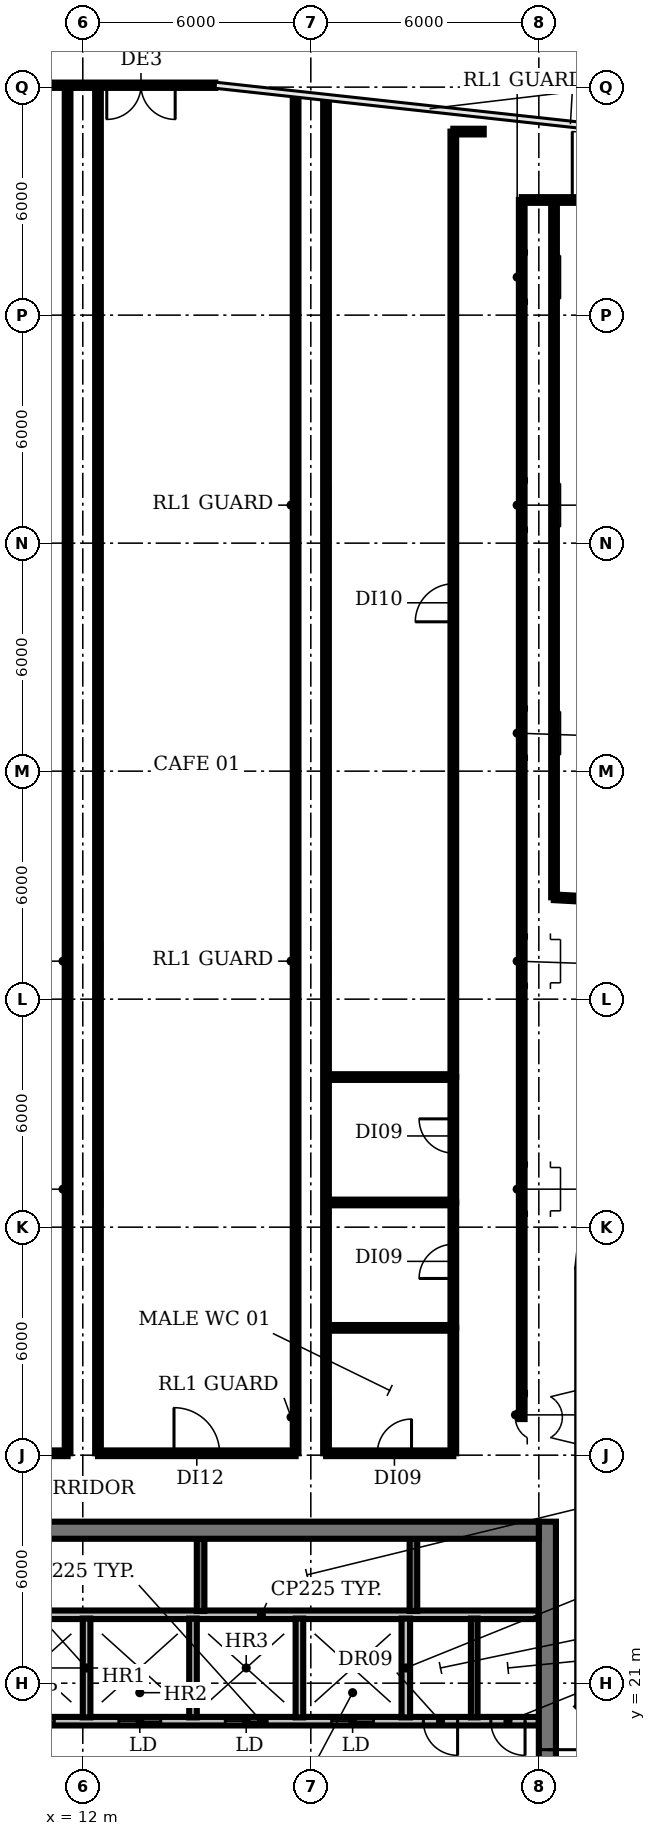
"""IFC4 building model, lengths in metres.
Left out: names, types, materials, properties, quantities, classifications, styles, units other than length and angle.
Written with IfcOpenShell. Run it as: python <this file> out.ifc"""

import sys

from ifc_helpers import new_model, si_unit, direction, frame, frame_2d, origin, place, context, subcontext, project, spatial, rectangle, extrude, element, fill, save


model = new_model("IFC4")
c1 = context("Model", 3, precision=1e-05, world=origin(), true_north=direction((0.0, 1.0)))
c2 = subcontext(c1, "Body", "Model", "MODEL_VIEW")
j1 = project(units=[si_unit("LENGTHUNIT", "METRE"), si_unit("PLANEANGLEUNIT", "RADIAN")], contexts=[c1])
p1 = place(None, origin())
s1 = spatial("IfcSite", under=j1, at=p1, CompositionType="ELEMENT")
p2 = place(p1, origin())
s2 = spatial("IfcBuilding", under=s1, at=p2, CompositionType="ELEMENT")
p3 = place(p2, frame((0.0, 0.0, 255.8)))
s3 = spatial("IfcBuildingStorey", under=s2, at=p3, CompositionType="ELEMENT", Elevation=255.8)
p4 = place(p3, frame((15.487, 63.05, 0.0), z_axis=(0.0, 0.0, 1.0), x_axis=(-1.0, 0.0, 0.0)))
e1 = element("IfcWall", 1, at=p4, inside=s3, PredefinedType="SOLIDWALL", context=c2, shape_type="SweptSolid", body=[
    extrude(rectangle(XDim=5.512, YDim=0.14, at=frame_2d((2.756, 0.0))), origin(), (0.0, 0.0, 1.0), 8.05),
])
p5 = place(p4, frame((1.056, 0.0, 0.0)))
e2 = element("IfcOpeningElement", 2, at=p5, cuts=e1, PredefinedType="OPENING", context=c2, shape_type="SweptSolid", body=[
    extrude(rectangle(XDim=1.8, YDim=2.4, at=frame_2d((0.9, 1.2))), frame((0.0, 0.08, 0.0), z_axis=(0.0, -1.0, 0.0), x_axis=(1.0, 0.0, 0.0)), (0.0, 0.0, 1.0), 0.16),
])
p6 = place(p3, frame((24.0, 20.0, 0.0), z_axis=(0.0, 0.0, 1.0), x_axis=(-1.0, 0.0, 0.0)))
e3 = element("IfcWall", 3, at=p6, inside=s3, PredefinedType="PARTITIONING", context=c2, shape_type="SweptSolid", body=[
    extrude(rectangle(XDim=14.6, YDim=0.225, at=frame_2d((7.3, 0.0))), origin(), (0.0, 0.0, 1.0), 8.05),
])
p7 = place(p6, frame((12.75, 0.0, 0.0)))
e4 = element("IfcOpeningElement", 4, at=p7, cuts=e3, PredefinedType="OPENING", context=c2, shape_type="SweptSolid", body=[
    extrude(rectangle(XDim=1.1, YDim=2.1, at=frame_2d((0.55, 1.05))), frame((0.0, 0.123, 0.0), z_axis=(0.0, -1.0, 0.0), x_axis=(1.0, 0.0, 0.0)), (0.0, 0.0, 1.0), 0.245),
])
p8 = place(p6, frame((9.95, 0.0, 0.0)))
e5 = element("IfcOpeningElement", 5, at=p8, cuts=e3, PredefinedType="OPENING", context=c2, shape_type="SweptSolid", body=[
    extrude(rectangle(XDim=1.1, YDim=2.1, at=frame_2d((0.55, 1.05))), frame((0.0, 0.123, 0.0), z_axis=(0.0, -1.0, 0.0), x_axis=(1.0, 0.0, 0.0)), (0.0, 0.0, 1.0), 0.245),
])
p9 = place(p6, frame((7.15, 0.0, 0.0)))
e6 = element("IfcOpeningElement", 6, at=p9, cuts=e3, PredefinedType="OPENING", context=c2, shape_type="SweptSolid", body=[
    extrude(rectangle(XDim=1.1, YDim=2.1, at=frame_2d((0.55, 1.05))), frame((0.0, 0.123, 0.0), z_axis=(0.0, -1.0, 0.0), x_axis=(1.0, 0.0, 0.0)), (0.0, 0.0, 1.0), 0.245),
])
p10 = place(p6, frame((4.35, 0.0, 0.0)))
e7 = element("IfcOpeningElement", 7, at=p10, cuts=e3, PredefinedType="OPENING", context=c2, shape_type="SweptSolid", body=[
    extrude(rectangle(XDim=1.1, YDim=2.1, at=frame_2d((0.55, 1.05))), frame((0.0, 0.123, 0.0), z_axis=(0.0, -1.0, 0.0), x_axis=(1.0, 0.0, 0.0)), (0.0, 0.0, 1.0), 0.245),
])
p11 = place(p6, frame((2.137, 0.0, 0.0)))
e8 = element("IfcOpeningElement", 8, at=p11, cuts=e3, PredefinedType="OPENING", context=c2, shape_type="SweptSolid", body=[
    extrude(rectangle(XDim=0.9, YDim=2.1, at=frame_2d((0.45, 1.05))), frame((0.0, 0.123, 0.0), z_axis=(0.0, -1.0, 0.0), x_axis=(1.0, 0.0, 0.0)), (0.0, 0.0, 1.0), 0.245),
])
p12 = place(p6, frame((0.363, 0.0, 0.0)))
e9 = element("IfcOpeningElement", 9, at=p12, cuts=e3, PredefinedType="OPENING", context=c2, shape_type="SweptSolid", body=[
    extrude(rectangle(XDim=0.9, YDim=2.1, at=frame_2d((0.45, 1.05))), frame((0.0, 0.123, 0.0), z_axis=(0.0, -1.0, 0.0), x_axis=(1.0, 0.0, 0.0)), (0.0, 0.0, 1.0), 0.245),
])
p13 = place(p3, frame((9.4, 22.8, 0.0), z_axis=(0.0, 0.0, 1.0), x_axis=(1.0, 0.0, 0.0)))
e10 = element("IfcWall", 10, at=p13, inside=s3, PredefinedType="PARTITIONING", context=c2, shape_type="SweptSolid", body=[
    extrude(rectangle(XDim=14.6, YDim=0.225, at=frame_2d((7.3, 0.0))), origin(), (0.0, 0.0, 1.0), 8.05),
])
for number, where, z_axis, x_axis in (
    (11, (12.1, 20.1, 0.0), (0.0, 0.0, 1.0), (0.0, 1.0, 0.0)),
    (12, (14.9, 20.1, 0.0), (0.0, 0.0, 1.0), (0.0, 1.0, 0.0)),
):
    element("IfcWall", number, at=place(p3, frame(where, z_axis=z_axis, x_axis=x_axis)), inside=s3, PredefinedType="SOLIDWALL", context=c2, shape_type="SweptSolid", body=[
        extrude(rectangle(XDim=2.6, YDim=0.2, at=frame_2d((1.3, 0.0))), origin(), (0.0, 0.0, 1.0), 8.05),
    ])
p14 = place(p3, frame((15.1, 22.9, 0.0), z_axis=(0.0, 0.0, 1.0), x_axis=(0.0, 1.0, 0.0)))
e13 = element("IfcWall", 13, at=p14, inside=s3, PredefinedType="SHEAR", context=c2, shape_type="SweptSolid", body=[
    extrude(rectangle(XDim=1.9, YDim=0.2, at=frame_2d((0.95, 0.0))), origin(), (0.0, 0.0, 1.0), 8.05),
])
p15 = place(p3, frame((17.7, 20.1, 0.0), z_axis=(0.0, 0.0, 1.0), x_axis=(0.0, 1.0, 0.0)))
e14 = element("IfcWall", 14, at=p15, inside=s3, PredefinedType="SOLIDWALL", context=c2, shape_type="SweptSolid", body=[
    extrude(rectangle(XDim=2.6, YDim=0.2, at=frame_2d((1.3, 0.0))), origin(), (0.0, 0.0, 1.0), 8.05),
])
p16 = place(p3, frame((20.5, 20.1, 0.0), z_axis=(0.0, 0.0, 1.0), x_axis=(0.0, 1.0, 0.0)))
e15 = element("IfcWall", 15, at=p16, inside=s3, PredefinedType="PARTITIONING", context=c2, shape_type="SweptSolid", body=[
    extrude(rectangle(XDim=2.6, YDim=0.225, at=frame_2d((1.3, 0.0))), origin(), (0.0, 0.0, 1.0), 8.05),
])
p17 = place(p3, frame((20.7, 22.9, 0.0), z_axis=(0.0, 0.0, 1.0), x_axis=(0.0, 1.0, 0.0)))
e16 = element("IfcWall", 16, at=p17, inside=s3, PredefinedType="SHEAR", context=c2, shape_type="SweptSolid", body=[
    extrude(rectangle(XDim=1.9, YDim=0.2, at=frame_2d((0.95, 0.0))), origin(), (0.0, 0.0, 1.0), 8.05),
])
p18 = place(p3, frame((22.3, 20.1, 0.0), z_axis=(0.0, 0.0, 1.0), x_axis=(0.0, 1.0, 0.0)))
e17 = element("IfcWall", 17, at=p18, inside=s3, PredefinedType="PARTITIONING", context=c2, shape_type="SweptSolid", body=[
    extrude(rectangle(XDim=2.6, YDim=0.175, at=frame_2d((1.3, 0.0))), origin(), (0.0, 0.0, 1.0), 8.05),
])
p19 = place(p3, frame((24.225, 25.25, 0.0), z_axis=(0.0, 0.0, 1.0), x_axis=(0.0, -1.0, 0.0)))
e18 = element("IfcWall", 18, at=p19, inside=s3, PredefinedType="SHEAR", context=c2, shape_type="SweptSolid", body=[
    extrude(rectangle(XDim=20.3, YDim=0.45, at=frame_2d((10.15, 0.0))), origin(), (0.0, 0.0, 1.0), 8.05),
])
p20 = place(p19, frame((18.1, 0.0, 0.0)))
e19 = element("IfcOpeningElement", 19, at=p20, cuts=e18, PredefinedType="OPENING", context=c2, shape_type="SweptSolid", body=[
    extrude(rectangle(XDim=1.5, YDim=2.1, at=frame_2d((0.75, 1.05))), frame((0.0, 0.235, 0.0), z_axis=(0.0, -1.0, 0.0), x_axis=(1.0, 0.0, 0.0)), (0.0, 0.0, 1.0), 0.47),
])
p21 = place(p19, frame((12.0, 0.0, 0.0)))
e20 = element("IfcOpeningElement", 20, at=p21, cuts=e18, PredefinedType="OPENING", context=c2, shape_type="SweptSolid", body=[
    extrude(rectangle(XDim=0.9, YDim=2.1, at=frame_2d((0.45, 1.05))), frame((0.0, 0.235, 0.0), z_axis=(0.0, -1.0, 0.0), x_axis=(1.0, 0.0, 0.0)), (0.0, 0.0, 1.0), 0.47),
])
p22 = place(p19, frame((6.0, 0.0, 0.0)))
e21 = element("IfcOpeningElement", 21, at=p22, cuts=e18, PredefinedType="OPENING", context=c2, shape_type="SweptSolid", body=[
    extrude(rectangle(XDim=2.0, YDim=2.1, at=frame_2d((1.0, 1.05))), frame((0.0, 0.235, 0.0), z_axis=(0.0, -1.0, 0.0), x_axis=(1.0, 0.0, 0.0)), (0.0, 0.0, 1.0), 0.47),
])
p23 = place(p3, frame((6.0, 25.025, 0.0), z_axis=(0.0, 0.0, 1.0), x_axis=(1.0, 0.0, 0.0)))
e22 = element("IfcWall", 22, at=p23, inside=s3, PredefinedType="SHEAR", context=c2, shape_type="SweptSolid", body=[
    extrude(rectangle(XDim=18.0, YDim=0.45, at=frame_2d((9.0, 0.0))), origin(), (0.0, 0.0, 1.0), 8.05),
])
p24 = place(p3, frame((6.4, 27.05, 0.0), z_axis=(0.0, 0.0, 1.0), x_axis=(1.0, 0.0, 0.0)))
e23 = element("IfcWall", 23, at=p24, inside=s3, PredefinedType="PARTITIONING", context=c2, shape_type="SweptSolid", body=[
    extrude(rectangle(XDim=5.2, YDim=0.15, at=frame_2d((2.6, 0.0))), origin(), (0.0, 0.0, 1.0), 6.33),
])
p25 = place(p24, frame((2.0, 0.0, 0.0)))
e24 = element("IfcOpeningElement", 24, at=p25, cuts=e23, PredefinedType="OPENING", context=c2, shape_type="SweptSolid", body=[
    extrude(rectangle(XDim=1.2, YDim=2.1, at=frame_2d((0.6, 1.05))), frame((0.0, 0.085, 0.0), z_axis=(0.0, -1.0, 0.0), x_axis=(1.0, 0.0, 0.0)), (0.0, 0.0, 1.0), 0.17),
])
for number, where, z_axis, x_axis in (
    (25, (11.6, 27.05, 0.0), (0.0, 0.0, 1.0), (0.0, 1.0, 0.0)),
    (26, (12.4, 27.05, 0.0), (0.0, 0.0, 1.0), (0.0, 1.0, 0.0)),
):
    element("IfcWall", number, at=place(p3, frame(where, z_axis=z_axis, x_axis=x_axis)), inside=s3, PredefinedType="PARTITIONING", context=c2, shape_type="SweptSolid", body=[
        extrude(rectangle(XDim=35.95, YDim=0.15, at=frame_2d((17.975, 0.0))), origin(), (0.0, 0.0, 1.0), 6.33),
    ])
p26 = place(p3, frame((12.4, 27.05, 0.0), z_axis=(0.0, 0.0, 1.0), x_axis=(1.0, 0.0, 0.0)))
e27 = element("IfcWall", 27, at=p26, inside=s3, PredefinedType="PARTITIONING", context=c2, shape_type="SweptSolid", body=[
    extrude(rectangle(XDim=5.2, YDim=0.15, at=frame_2d((2.6, 0.0))), origin(), (0.0, 0.0, 1.0), 6.33),
])
p27 = place(p26, frame((2.0, 0.0, 0.0)))
e28 = element("IfcOpeningElement", 28, at=p27, cuts=e27, PredefinedType="OPENING", context=c2, shape_type="SweptSolid", body=[
    extrude(rectangle(XDim=1.2, YDim=2.1, at=frame_2d((0.6, 1.05))), frame((0.0, 0.085, 0.0), z_axis=(0.0, -1.0, 0.0), x_axis=(1.0, 0.0, 0.0)), (0.0, 0.0, 1.0), 0.17),
])
p28 = place(p3, frame((17.6, 27.05, 0.0), z_axis=(0.0, 0.0, 1.0), x_axis=(0.0, 1.0, 0.0)))
e29 = element("IfcWall", 29, at=p28, inside=s3, PredefinedType="PARTITIONING", context=c2, shape_type="SweptSolid", body=[
    extrude(rectangle(XDim=35.72, YDim=0.15, at=frame_2d((17.86, 0.0))), origin(), (0.0, 0.0, 1.0), 6.33),
])
p29 = place(p3, frame((18.4, 27.05, 0.0), z_axis=(0.0, 0.0, 1.0), x_axis=(0.0, 1.0, 0.0)))
e30 = element("IfcWall", 30, at=p29, inside=s3, PredefinedType="PARTITIONING", context=c2, shape_type="SweptSolid", body=[
    extrude(rectangle(XDim=35.63, YDim=0.15, at=frame_2d((17.815, 0.0))), origin(), (0.0, 0.0, 1.0), 6.33),
])
p30 = place(p3, frame((18.4, 27.05, 0.0), z_axis=(0.0, 0.0, 1.0), x_axis=(1.0, 0.0, 0.0)))
e31 = element("IfcWall", 31, at=p30, inside=s3, PredefinedType="PARTITIONING", context=c2, shape_type="SweptSolid", body=[
    extrude(rectangle(XDim=3.35, YDim=0.15, at=frame_2d((1.675, 0.0))), origin(), (0.0, 0.0, 1.0), 6.33),
])
p31 = place(p30, frame((1.35, 0.0, 0.0)))
e32 = element("IfcOpeningElement", 32, at=p31, cuts=e31, PredefinedType="OPENING", context=c2, shape_type="SweptSolid", body=[
    extrude(rectangle(XDim=0.9, YDim=2.1, at=frame_2d((0.45, 1.05))), frame((0.0, 0.085, 0.0), z_axis=(0.0, -1.0, 0.0), x_axis=(1.0, 0.0, 0.0)), (0.0, 0.0, 1.0), 0.17),
])
for number, where, z_axis, x_axis in (
    (33, (18.4, 30.35, 0.0), (0.0, 0.0, 1.0), (1.0, 0.0, 0.0)),
    (34, (18.4, 33.65, 0.0), (0.0, 0.0, 1.0), (1.0, 0.0, 0.0)),
    (35, (18.4, 36.95, 0.0), (0.0, 0.0, 1.0), (1.0, 0.0, 0.0)),
):
    element("IfcWall", number, at=place(p3, frame(where, z_axis=z_axis, x_axis=x_axis)), inside=s3, PredefinedType="PARTITIONING", context=c2, shape_type="SweptSolid", body=[
        extrude(rectangle(XDim=3.35, YDim=0.15, at=frame_2d((1.675, 0.0))), origin(), (0.0, 0.0, 1.0), 6.33),
    ])
p32 = place(p3, frame((21.75, 27.05, 0.0), z_axis=(0.0, 0.0, 1.0), x_axis=(0.0, 1.0, 0.0)))
e36 = element("IfcWall", 36, at=p32, inside=s3, PredefinedType="PARTITIONING", context=c2, shape_type="SweptSolid", body=[
    extrude(rectangle(XDim=3.3, YDim=0.15, at=frame_2d((1.65, 0.0))), origin(), (0.0, 0.0, 1.0), 6.33),
])
p33 = place(p3, frame((21.75, 30.35, 0.0), z_axis=(0.0, 0.0, 1.0), x_axis=(0.0, 1.0, 0.0)))
e37 = element("IfcWall", 37, at=p33, inside=s3, PredefinedType="PARTITIONING", context=c2, shape_type="SweptSolid", body=[
    extrude(rectangle(XDim=3.3, YDim=0.15, at=frame_2d((1.65, 0.0))), origin(), (0.0, 0.0, 1.0), 6.33),
])
p34 = place(p33, frame((1.3, 0.0, 0.0)))
e38 = element("IfcOpeningElement", 38, at=p34, cuts=e37, PredefinedType="OPENING", context=c2, shape_type="SweptSolid", body=[
    extrude(rectangle(XDim=0.9, YDim=2.1, at=frame_2d((0.45, 1.05))), frame((0.0, 0.085, 0.0), z_axis=(0.0, -1.0, 0.0), x_axis=(1.0, 0.0, 0.0)), (0.0, 0.0, 1.0), 0.17),
])
p35 = place(p3, frame((21.75, 33.65, 0.0), z_axis=(0.0, 0.0, 1.0), x_axis=(0.0, 1.0, 0.0)))
e39 = element("IfcWall", 39, at=p35, inside=s3, PredefinedType="PARTITIONING", context=c2, shape_type="SweptSolid", body=[
    extrude(rectangle(XDim=3.3, YDim=0.15, at=frame_2d((1.65, 0.0))), origin(), (0.0, 0.0, 1.0), 6.33),
])
p36 = place(p35, frame((1.3, 0.0, 0.0)))
e40 = element("IfcOpeningElement", 40, at=p36, cuts=e39, PredefinedType="OPENING", context=c2, shape_type="SweptSolid", body=[
    extrude(rectangle(XDim=0.9, YDim=2.1, at=frame_2d((0.45, 1.05))), frame((0.0, 0.085, 0.0), z_axis=(0.0, -1.0, 0.0), x_axis=(1.0, 0.0, 0.0)), (0.0, 0.0, 1.0), 0.17),
])
p37 = place(p3, frame((21.75, 36.95, 0.0), z_axis=(0.0, 0.0, 1.0), x_axis=(0.0, 1.0, 0.0)))
e41 = element("IfcWall", 41, at=p37, inside=s3, PredefinedType="PARTITIONING", context=c2, shape_type="SweptSolid", body=[
    extrude(rectangle(XDim=24.88, YDim=0.15, at=frame_2d((12.44, 0.0))), origin(), (0.0, 0.0, 1.0), 6.33),
])
p38 = place(p37, frame((11.98, 0.0, 0.0)))
e42 = element("IfcOpeningElement", 42, at=p38, cuts=e41, PredefinedType="OPENING", context=c2, shape_type="SweptSolid", body=[
    extrude(rectangle(XDim=1.0, YDim=2.1, at=frame_2d((0.5, 1.05))), frame((0.0, 0.085, 0.0), z_axis=(0.0, -1.0, 0.0), x_axis=(1.0, 0.0, 0.0)), (0.0, 0.0, 1.0), 0.17),
])
p39 = place(p3, frame((21.75, 61.83, 0.0), z_axis=(0.0, 0.0, 1.0), x_axis=(1.0, 0.0, 0.0)))
e43 = element("IfcWall", 43, at=p39, inside=s3, PredefinedType="PARTITIONING", context=c2, shape_type="SweptSolid", body=[
    extrude(rectangle(XDim=0.8, YDim=0.15, at=frame_2d((0.4, 0.0))), origin(), (0.0, 0.0, 1.0), 6.33),
])
p40 = place(p3, frame((23.55, 27.95, 0.0), z_axis=(0.0, 0.0, 1.0), x_axis=(0.0, 1.0, 0.0)))
e44 = element("IfcWall", 44, at=p40, inside=s3, PredefinedType="PARTITIONING", context=c2, shape_type="SweptSolid", body=[
    extrude(rectangle(XDim=32.08, YDim=0.15, at=frame_2d((16.04, 0.0))), origin(), (0.0, 0.0, 1.0), 6.33),
])
p41 = place(p3, frame((23.55, 60.03, 0.0), z_axis=(0.0, 0.0, 1.0), x_axis=(1.0, 0.0, 0.0)))
e45 = element("IfcWall", 45, at=p41, inside=s3, PredefinedType="PARTITIONING", context=c2, shape_type="SweptSolid", body=[
    extrude(rectangle(XDim=4.53, YDim=0.15, at=frame_2d((2.265, 0.0))), origin(), (0.0, 0.0, 1.0), 6.33),
])
p42 = place(p41, frame((1.33, 0.0, 0.0)))
e46 = element("IfcOpeningElement", 46, at=p42, cuts=e45, PredefinedType="OPENING", context=c2, shape_type="SweptSolid", body=[
    extrude(rectangle(XDim=1.8, YDim=2.1, at=frame_2d((0.9, 1.05))), frame((0.0, 0.085, 0.0), z_axis=(0.0, -1.0, 0.0), x_axis=(1.0, 0.0, 0.0)), (0.0, 0.0, 1.0), 0.17),
])
p43 = place(p3, frame((24.4, 41.68, 0.0), z_axis=(0.0, 0.0, 1.0), x_axis=(0.0, 1.0, 0.0)))
e47 = element("IfcWall", 47, at=p43, inside=s3, PredefinedType="PARTITIONING", context=c2, shape_type="SweptSolid", body=[
    extrude(rectangle(XDim=18.34, YDim=0.15, at=frame_2d((9.17, 0.0))), origin(), (0.0, 0.0, 1.0), 6.33),
])
p44 = place(p3, frame((24.4, 41.68, 0.0), z_axis=(0.0, 0.0, 1.0), x_axis=(0.998538848833, -0.054038572996, 0.0)))
e48 = element("IfcWall", 48, at=p44, inside=s3, PredefinedType="PARTITIONING", context=c2, shape_type="SweptSolid", body=[
    extrude(rectangle(XDim=1.663, YDim=0.15, at=frame_2d((0.831, 0.0))), origin(), (0.0, 0.0, 1.0), 6.33),
])
p45 = place(p5, origin())
e49 = element("IfcDoor", 49, at=p45, inside=s3, OperationType="DOUBLE_DOOR_DOUBLE_SWING", PredefinedType="DOOR", context=c2, shape_type="SweptSolid", body=[
    extrude(rectangle(XDim=1.8, YDim=2.4, at=frame_2d((0.9, 1.2))), frame((0.0, 0.025, 0.0), z_axis=(0.0, -1.0, 0.0), x_axis=(1.0, 0.0, 0.0)), (0.0, 0.0, 1.0), 0.05),
])
fill(e2, e49)
p46 = place(p7, origin())
e50 = element("IfcDoor", 50, at=p46, inside=s3, OperationType="DOUBLE_DOOR_SLIDING", PredefinedType="DOOR", context=c2, shape_type="SweptSolid", body=[
    extrude(rectangle(XDim=1.1, YDim=2.1, at=frame_2d((0.55, 1.05))), frame((0.0, 0.025, 0.0), z_axis=(0.0, -1.0, 0.0), x_axis=(1.0, 0.0, 0.0)), (0.0, 0.0, 1.0), 0.05),
])
fill(e4, e50)
p47 = place(p8, origin())
e51 = element("IfcDoor", 51, at=p47, inside=s3, OperationType="DOUBLE_DOOR_SLIDING", PredefinedType="DOOR", context=c2, shape_type="SweptSolid", body=[
    extrude(rectangle(XDim=1.1, YDim=2.1, at=frame_2d((0.55, 1.05))), frame((0.0, 0.025, 0.0), z_axis=(0.0, -1.0, 0.0), x_axis=(1.0, 0.0, 0.0)), (0.0, 0.0, 1.0), 0.05),
])
fill(e5, e51)
p48 = place(p9, origin())
e52 = element("IfcDoor", 52, at=p48, inside=s3, OperationType="DOUBLE_DOOR_SLIDING", PredefinedType="DOOR", context=c2, shape_type="SweptSolid", body=[
    extrude(rectangle(XDim=1.1, YDim=2.1, at=frame_2d((0.55, 1.05))), frame((0.0, 0.025, 0.0), z_axis=(0.0, -1.0, 0.0), x_axis=(1.0, 0.0, 0.0)), (0.0, 0.0, 1.0), 0.05),
])
fill(e6, e52)
p49 = place(p10, origin())
e53 = element("IfcDoor", 53, at=p49, inside=s3, OperationType="DOUBLE_DOOR_SLIDING", PredefinedType="DOOR", context=c2, shape_type="SweptSolid", body=[
    extrude(rectangle(XDim=1.1, YDim=2.1, at=frame_2d((0.55, 1.05))), frame((0.0, 0.025, 0.0), z_axis=(0.0, -1.0, 0.0), x_axis=(1.0, 0.0, 0.0)), (0.0, 0.0, 1.0), 0.05),
])
fill(e7, e53)
p50 = place(p11, origin())
e54 = element("IfcDoor", 54, at=p50, inside=s3, OperationType="SINGLE_SWING_LEFT", PredefinedType="DOOR", context=c2, shape_type="SweptSolid", body=[
    extrude(rectangle(XDim=0.9, YDim=2.1, at=frame_2d((0.45, 1.05))), frame((0.0, 0.025, 0.0), z_axis=(0.0, -1.0, 0.0), x_axis=(1.0, 0.0, 0.0)), (0.0, 0.0, 1.0), 0.05),
])
fill(e8, e54)
p51 = place(p12, origin())
e55 = element("IfcDoor", 55, at=p51, inside=s3, OperationType="SINGLE_SWING_LEFT", PredefinedType="DOOR", context=c2, shape_type="SweptSolid", body=[
    extrude(rectangle(XDim=0.9, YDim=2.1, at=frame_2d((0.45, 1.05))), frame((0.0, 0.025, 0.0), z_axis=(0.0, -1.0, 0.0), x_axis=(1.0, 0.0, 0.0)), (0.0, 0.0, 1.0), 0.05),
])
fill(e9, e55)
p52 = place(p22, origin())
e56 = element("IfcDoor", 56, at=p52, inside=s3, OperationType="DOUBLE_DOOR_SINGLE_SWING", PredefinedType="DOOR", context=c2, shape_type="SweptSolid", body=[
    extrude(rectangle(XDim=2.0, YDim=2.1, at=frame_2d((1.0, 1.05))), frame((0.0, 0.025, 0.0), z_axis=(0.0, -1.0, 0.0), x_axis=(1.0, 0.0, 0.0)), (0.0, 0.0, 1.0), 0.05),
])
fill(e21, e56)
p53 = place(p27, origin())
e57 = element("IfcDoor", 57, at=p53, inside=s3, OperationType="SINGLE_SWING_LEFT", PredefinedType="DOOR", context=c2, shape_type="SweptSolid", body=[
    extrude(rectangle(XDim=1.2, YDim=2.1, at=frame_2d((0.6, 1.05))), frame((0.0, 0.025, 0.0), z_axis=(0.0, -1.0, 0.0), x_axis=(1.0, 0.0, 0.0)), (0.0, 0.0, 1.0), 0.05),
])
fill(e28, e57)
p54 = place(p31, origin())
e58 = element("IfcDoor", 58, at=p54, inside=s3, OperationType="SINGLE_SWING_RIGHT", PredefinedType="DOOR", context=c2, shape_type="SweptSolid", body=[
    extrude(rectangle(XDim=0.9, YDim=2.1, at=frame_2d((0.45, 1.05))), frame((0.0, 0.025, 0.0), z_axis=(0.0, -1.0, 0.0), x_axis=(1.0, 0.0, 0.0)), (0.0, 0.0, 1.0), 0.05),
])
fill(e32, e58)
p55 = place(p34, origin())
e59 = element("IfcDoor", 59, at=p55, inside=s3, OperationType="SINGLE_SWING_LEFT", PredefinedType="DOOR", context=c2, shape_type="SweptSolid", body=[
    extrude(rectangle(XDim=0.9, YDim=2.1, at=frame_2d((0.45, 1.05))), frame((0.0, 0.025, 0.0), z_axis=(0.0, -1.0, 0.0), x_axis=(1.0, 0.0, 0.0)), (0.0, 0.0, 1.0), 0.05),
])
fill(e38, e59)
p56 = place(p36, origin())
e60 = element("IfcDoor", 60, at=p56, inside=s3, OperationType="SINGLE_SWING_RIGHT", PredefinedType="DOOR", context=c2, shape_type="SweptSolid", body=[
    extrude(rectangle(XDim=0.9, YDim=2.1, at=frame_2d((0.45, 1.05))), frame((0.0, 0.025, 0.0), z_axis=(0.0, -1.0, 0.0), x_axis=(1.0, 0.0, 0.0)), (0.0, 0.0, 1.0), 0.05),
])
fill(e40, e60)
p57 = place(p38, origin())
e61 = element("IfcDoor", 61, at=p57, inside=s3, OperationType="SINGLE_SWING_LEFT", PredefinedType="DOOR", context=c2, shape_type="SweptSolid", body=[
    extrude(rectangle(XDim=1.0, YDim=2.1, at=frame_2d((0.5, 1.05))), frame((0.0, 0.025, 0.0), z_axis=(0.0, -1.0, 0.0), x_axis=(1.0, 0.0, 0.0)), (0.0, 0.0, 1.0), 0.05),
])
fill(e42, e61)
p58 = place(p42, origin())
e62 = element("IfcDoor", 62, at=p58, inside=s3, OperationType="SINGLE_SWING_LEFT", PredefinedType="DOOR", context=c2, shape_type="SweptSolid", body=[
    extrude(rectangle(XDim=1.8, YDim=2.1, at=frame_2d((0.9, 1.05))), frame((0.0, 0.025, 0.0), z_axis=(0.0, -1.0, 0.0), x_axis=(1.0, 0.0, 0.0)), (0.0, 0.0, 1.0), 0.05),
])
fill(e46, e62)
save(model, sys.argv[1])
